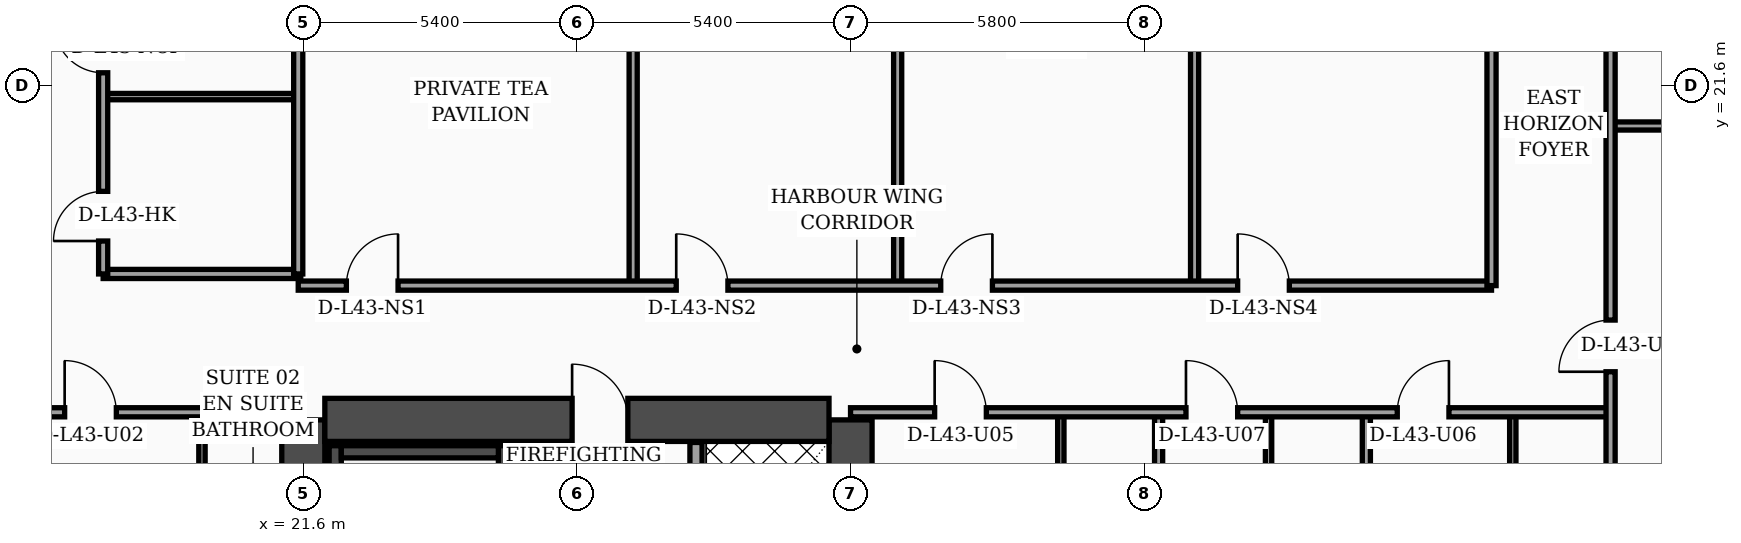
"""IFC4 building model, lengths in metres.
Left out: names, types, materials, properties, quantities, classifications, styles, units other than length and angle.
Written with IfcOpenShell. Run it as: python <this file> out.ifc"""

import sys

from ifc_helpers import new_model, si_unit, direction, frame, frame_2d, origin, place, context, subcontext, project, spatial, rectangle, extrude, element, fill, save


model = new_model("IFC4")
c1 = context("Model", 3, precision=1e-05, world=origin(), true_north=direction((0.0, 1.0)))
c2 = subcontext(c1, "Body", "Model", "MODEL_VIEW")
j1 = project(units=[si_unit("LENGTHUNIT", "METRE"), si_unit("PLANEANGLEUNIT", "RADIAN")], contexts=[c1])
p1 = place(None, origin())
s1 = spatial("IfcSite", under=j1, at=p1, CompositionType="ELEMENT")
p2 = place(p1, origin())
s2 = spatial("IfcBuilding", under=s1, at=p2, CompositionType="ELEMENT")
p3 = place(p2, frame((0.0, 0.0, 175.1)))
s3 = spatial("IfcBuildingStorey", under=s2, at=p3, CompositionType="ELEMENT", Elevation=175.1)
for number, where, z_axis, x_axis in (
    (1, (21.6, 4.6, 0.0), (0.0, 0.0, 1.0), (0.0, 1.0, 0.0)),
    (2, (32.4, 4.6, 0.0), (0.0, 0.0, 1.0), (0.0, 1.0, 0.0)),
):
    element("IfcWall", number, at=place(p3, frame(where, z_axis=z_axis, x_axis=x_axis)), inside=s3, PredefinedType="SHEAR", context=c2, shape_type="SweptSolid", body=[
        extrude(rectangle(XDim=10.4, YDim=0.85, at=frame_2d((5.2, 0.0))), origin(), (0.0, 0.0, 1.0), 3.56),
    ])
p4 = place(p3, frame((22.025, 15.0, 0.0), z_axis=(0.0, 0.0, 1.0), x_axis=(1.0, 0.0, 0.0)))
e3 = element("IfcWall", 3, at=p4, inside=s3, PredefinedType="SHEAR", context=c2, shape_type="SweptSolid", body=[
    extrude(rectangle(XDim=9.95, YDim=0.85, at=frame_2d((4.975, 0.0))), origin(), (0.0, 0.0, 1.0), 3.56),
])
p5 = place(p4, frame((4.88, 0.0, 0.0)))
e4 = element("IfcOpeningElement", 4, at=p5, cuts=e3, PredefinedType="OPENING", context=c2, shape_type="SweptSolid", body=[
    extrude(rectangle(XDim=1.1, YDim=2.2, at=frame_2d((0.55, 1.1))), frame((0.0, 0.435, 0.0), z_axis=(0.0, -1.0, 0.0), x_axis=(1.0, 0.0, 0.0)), (0.0, 0.0, 1.0), 0.87),
])
p6 = place(p3, frame((22.23, 5.025, 0.0), z_axis=(0.0, 0.0, 1.0), x_axis=(0.0, 1.0, 0.0)))
e5 = element("IfcWall", 5, at=p6, inside=s3, PredefinedType="SOLIDWALL", context=c2, shape_type="SweptSolid", body=[
    extrude(rectangle(XDim=9.465, YDim=0.24, at=frame_2d((4.732, 0.0))), origin(), (0.0, 0.0, 1.0), 3.56),
])
p7 = place(p3, frame((25.57, 5.025, 0.0), z_axis=(0.0, 0.0, 1.0), x_axis=(0.0, 1.0, 0.0)))
e6 = element("IfcWall", 6, at=p7, inside=s3, PredefinedType="SOLIDWALL", context=c2, shape_type="SweptSolid", body=[
    extrude(rectangle(XDim=9.465, YDim=0.24, at=frame_2d((4.732, 0.0))), origin(), (0.0, 0.0, 1.0), 3.56),
])
p8 = place(p7, frame((0.35, 0.0, 0.0)))
e7 = element("IfcOpeningElement", 7, at=p8, cuts=e6, PredefinedType="OPENING", context=c2, shape_type="SweptSolid", body=[
    extrude(rectangle(XDim=1.15, YDim=2.2, at=frame_2d((0.575, 1.1))), frame((0.0, 0.13, 0.0), z_axis=(0.0, -1.0, 0.0), x_axis=(1.0, 0.0, 0.0)), (0.0, 0.0, 1.0), 0.26),
])
p9 = place(p3, frame((22.35, 14.37, 0.0), z_axis=(0.0, 0.0, 1.0), x_axis=(1.0, 0.0, 0.0)))
e8 = element("IfcWall", 8, at=p9, inside=s3, PredefinedType="SOLIDWALL", context=c2, shape_type="SweptSolid", body=[
    extrude(rectangle(XDim=3.1, YDim=0.24, at=frame_2d((1.55, 0.0))), origin(), (0.0, 0.0, 1.0), 3.56),
])
p10 = place(p3, frame((29.35, 5.045, 0.0), z_axis=(0.0, 0.0, 1.0), x_axis=(0.0, 1.0, 0.0)))
e9 = element("IfcWall", 9, at=p10, inside=s3, PredefinedType="SOLIDWALL", context=c2, shape_type="SweptSolid", body=[
    extrude(rectangle(XDim=9.51, YDim=0.24, at=frame_2d((4.755, 0.0))), origin(), (0.0, 0.0, 1.0), 3.56),
])
p11 = place(p10, frame((0.55, 0.0, 0.0)))
e10 = element("IfcOpeningElement", 10, at=p11, cuts=e9, PredefinedType="OPENING", context=c2, shape_type="SweptSolid", body=[
    extrude(rectangle(XDim=1.3, YDim=2.35, at=frame_2d((0.65, 1.175))), frame((0.0, 0.13, 0.0), z_axis=(0.0, -1.0, 0.0), x_axis=(1.0, 0.0, 0.0)), (0.0, 0.0, 1.0), 0.26),
])
p12 = place(p3, frame((19.6, 2.44, 0.0), z_axis=(0.0, 0.0, 1.0), x_axis=(0.0, 1.0, 0.0)))
e11 = element("IfcWall", 11, at=p12, inside=s3, PredefinedType="PARTITIONING", context=c2, shape_type="SweptSolid", body=[
    extrude(rectangle(XDim=12.71, YDim=0.125, at=frame_2d((6.355, 0.0))), origin(), (0.0, 0.0, 1.0), 2.49),
])
p13 = place(p12, frame((4.34, 0.0, 0.0)))
e12 = element("IfcOpeningElement", 12, at=p13, cuts=e11, PredefinedType="OPENING", context=c2, shape_type="SweptSolid", body=[
    extrude(rectangle(XDim=0.96, YDim=2.2, at=frame_2d((0.48, 1.1))), frame((0.0, 0.073, 0.0), z_axis=(0.0, -1.0, 0.0), x_axis=(1.0, 0.0, 0.0)), (0.0, 0.0, 1.0), 0.145),
])
p14 = place(p12, frame((10.18, 0.0, 0.0)))
e13 = element("IfcOpeningElement", 13, at=p14, cuts=e11, PredefinedType="OPENING", context=c2, shape_type="SweptSolid", body=[
    extrude(rectangle(XDim=0.9, YDim=2.15, at=frame_2d((0.45, 1.075))), frame((0.0, 0.073, 0.0), z_axis=(0.0, -1.0, 0.0), x_axis=(1.0, 0.0, 0.0)), (0.0, 0.0, 1.0), 0.145),
])
p15 = place(p3, frame((15.15, 15.15, 0.0), z_axis=(0.0, 0.0, 1.0), x_axis=(1.0, 0.0, 0.0)))
e14 = element("IfcWall", 14, at=p15, inside=s3, PredefinedType="PARTITIONING", context=c2, shape_type="SweptSolid", body=[
    extrude(rectangle(XDim=6.45, YDim=0.18, at=frame_2d((3.225, 0.0))), origin(), (0.0, 0.0, 1.0), 2.49),
])
p16 = place(p15, frame((1.74, 0.0, 0.0)))
e15 = element("IfcOpeningElement", 15, at=p16, cuts=e14, PredefinedType="OPENING", context=c2, shape_type="SweptSolid", body=[
    extrude(rectangle(XDim=1.02, YDim=2.2, at=frame_2d((0.51, 1.1))), frame((0.0, 0.1, 0.0), z_axis=(0.0, -1.0, 0.0), x_axis=(1.0, 0.0, 0.0)), (0.0, 0.0, 1.0), 0.2),
])
p17 = place(p3, frame((17.65, 17.88, 0.0), z_axis=(0.0, 0.0, 1.0), x_axis=(1.0, 0.0, 0.0)))
e16 = element("IfcWall", 16, at=p17, inside=s3, PredefinedType="PARTITIONING", context=c2, shape_type="SweptSolid", body=[
    extrude(rectangle(XDim=3.9, YDim=0.18, at=frame_2d((1.95, 0.0))), origin(), (0.0, 0.0, 1.0), 3.09),
])
p18 = place(p3, frame((17.65, 21.38, 0.0), z_axis=(0.0, 0.0, 1.0), x_axis=(1.0, 0.0, 0.0)))
e17 = element("IfcWall", 17, at=p18, inside=s3, PredefinedType="PARTITIONING", context=c2, shape_type="SweptSolid", body=[
    extrude(rectangle(XDim=3.9, YDim=0.125, at=frame_2d((1.95, 0.0))), origin(), (0.0, 0.0, 1.0), 3.56),
])
p19 = place(p3, frame((21.5, 17.88, 0.0), z_axis=(0.0, 0.0, 1.0), x_axis=(0.0, 1.0, 0.0)))
e18 = element("IfcWall", 18, at=p19, inside=s3, PredefinedType="PARTITIONING", context=c2, shape_type="SweptSolid", body=[
    extrude(rectangle(XDim=6.44, YDim=0.18, at=frame_2d((3.22, 0.0))), origin(), (0.0, 0.0, 1.0), 3.09),
])
p20 = place(p3, frame((17.65, 17.88, 0.0), z_axis=(0.0, 0.0, 1.0), x_axis=(0.0, 1.0, 0.0)))
e19 = element("IfcWall", 19, at=p20, inside=s3, PredefinedType="PARTITIONING", context=c2, shape_type="SweptSolid", body=[
    extrude(rectangle(XDim=6.44, YDim=0.18, at=frame_2d((3.22, 0.0))), origin(), (0.0, 0.0, 1.0), 3.09),
])
p21 = place(p20, frame((0.65, 0.0, 0.0)))
e20 = element("IfcOpeningElement", 20, at=p21, cuts=e19, PredefinedType="OPENING", context=c2, shape_type="SweptSolid", body=[
    extrude(rectangle(XDim=0.98, YDim=2.15, at=frame_2d((0.49, 1.075))), frame((0.0, 0.1, 0.0), z_axis=(0.0, -1.0, 0.0), x_axis=(1.0, 0.0, 0.0)), (0.0, 0.0, 1.0), 0.2),
])
p22 = place(p20, frame((3.97, 0.0, 0.0)))
e21 = element("IfcOpeningElement", 21, at=p22, cuts=e19, PredefinedType="OPENING", context=c2, shape_type="SweptSolid", body=[
    extrude(rectangle(XDim=0.96, YDim=2.2, at=frame_2d((0.48, 1.1))), frame((0.0, 0.1, 0.0), z_axis=(0.0, -1.0, 0.0), x_axis=(1.0, 0.0, 0.0)), (0.0, 0.0, 1.0), 0.2),
])
p23 = place(p3, frame((36.55, 2.44, 0.0), z_axis=(0.0, 0.0, 1.0), x_axis=(0.0, 1.0, 0.0)))
e22 = element("IfcWall", 22, at=p23, inside=s3, PredefinedType="PARTITIONING", context=c2, shape_type="SweptSolid", body=[
    extrude(rectangle(XDim=12.71, YDim=0.125, at=frame_2d((6.355, 0.0))), origin(), (0.0, 0.0, 1.0), 2.94),
])
p24 = place(p23, frame((4.35, 0.0, 0.0)))
e23 = element("IfcOpeningElement", 23, at=p24, cuts=e22, PredefinedType="OPENING", context=c2, shape_type="SweptSolid", body=[
    extrude(rectangle(XDim=0.96, YDim=2.2, at=frame_2d((0.48, 1.1))), frame((0.0, 0.073, 0.0), z_axis=(0.0, -1.0, 0.0), x_axis=(1.0, 0.0, 0.0)), (0.0, 0.0, 1.0), 0.145),
])
p25 = place(p23, frame((10.21, 0.0, 0.0)))
e24 = element("IfcOpeningElement", 24, at=p25, cuts=e22, PredefinedType="OPENING", context=c2, shape_type="SweptSolid", body=[
    extrude(rectangle(XDim=0.9, YDim=2.15, at=frame_2d((0.45, 1.075))), frame((0.0, 0.073, 0.0), z_axis=(0.0, -1.0, 0.0), x_axis=(1.0, 0.0, 0.0)), (0.0, 0.0, 1.0), 0.145),
])
p26 = place(p3, frame((40.65, 2.44, 0.0), z_axis=(0.0, 0.0, 1.0), x_axis=(0.0, 1.0, 0.0)))
e25 = element("IfcWall", 25, at=p26, inside=s3, PredefinedType="PARTITIONING", context=c2, shape_type="SweptSolid", body=[
    extrude(rectangle(XDim=12.71, YDim=0.125, at=frame_2d((6.355, 0.0))), origin(), (0.0, 0.0, 1.0), 2.94),
])
p27 = place(p26, frame((4.35, 0.0, 0.0)))
e26 = element("IfcOpeningElement", 26, at=p27, cuts=e25, PredefinedType="OPENING", context=c2, shape_type="SweptSolid", body=[
    extrude(rectangle(XDim=0.96, YDim=2.2, at=frame_2d((0.48, 1.1))), frame((0.0, 0.073, 0.0), z_axis=(0.0, -1.0, 0.0), x_axis=(1.0, 0.0, 0.0)), (0.0, 0.0, 1.0), 0.145),
])
p28 = place(p26, frame((10.21, 0.0, 0.0)))
e27 = element("IfcOpeningElement", 27, at=p28, cuts=e25, PredefinedType="OPENING", context=c2, shape_type="SweptSolid", body=[
    extrude(rectangle(XDim=0.9, YDim=2.15, at=frame_2d((0.45, 1.075))), frame((0.0, 0.073, 0.0), z_axis=(0.0, -1.0, 0.0), x_axis=(1.0, 0.0, 0.0)), (0.0, 0.0, 1.0), 0.145),
])
p29 = place(p3, frame((38.48, 2.44, 0.0), z_axis=(0.0, 0.0, 1.0), x_axis=(0.0, 1.0, 0.0)))
e28 = element("IfcWall", 28, at=p29, inside=s3, PredefinedType="PARTITIONING", context=c2, shape_type="SweptSolid", body=[
    extrude(rectangle(XDim=12.71, YDim=0.16, at=frame_2d((6.355, 0.0))), origin(), (0.0, 0.0, 1.0), 2.94),
])
p30 = place(p3, frame((45.47, 2.44, 0.0), z_axis=(0.0, 0.0, 1.0), x_axis=(0.0, 1.0, 0.0)))
e29 = element("IfcWall", 29, at=p30, inside=s3, PredefinedType="PARTITIONING", context=c2, shape_type="SweptSolid", body=[
    extrude(rectangle(XDim=12.71, YDim=0.125, at=frame_2d((6.355, 0.0))), origin(), (0.0, 0.0, 1.0), 3.04),
])
p31 = place(p30, frame((4.35, 0.0, 0.0)))
e30 = element("IfcOpeningElement", 30, at=p31, cuts=e29, PredefinedType="OPENING", context=c2, shape_type="SweptSolid", body=[
    extrude(rectangle(XDim=0.96, YDim=2.2, at=frame_2d((0.48, 1.1))), frame((0.0, 0.073, 0.0), z_axis=(0.0, -1.0, 0.0), x_axis=(1.0, 0.0, 0.0)), (0.0, 0.0, 1.0), 0.145),
])
p32 = place(p30, frame((10.21, 0.0, 0.0)))
e31 = element("IfcOpeningElement", 31, at=p32, cuts=e29, PredefinedType="OPENING", context=c2, shape_type="SweptSolid", body=[
    extrude(rectangle(XDim=0.9, YDim=2.15, at=frame_2d((0.45, 1.075))), frame((0.0, 0.073, 0.0), z_axis=(0.0, -1.0, 0.0), x_axis=(1.0, 0.0, 0.0)), (0.0, 0.0, 1.0), 0.145),
])
p33 = place(p3, frame((42.58, 2.44, 0.0), z_axis=(0.0, 0.0, 1.0), x_axis=(0.0, 1.0, 0.0)))
e32 = element("IfcWall", 32, at=p33, inside=s3, PredefinedType="PARTITIONING", context=c2, shape_type="SweptSolid", body=[
    extrude(rectangle(XDim=12.71, YDim=0.16, at=frame_2d((6.355, 0.0))), origin(), (0.0, 0.0, 1.0), 3.04),
])
p34 = place(p3, frame((32.4, 15.15, 0.0), z_axis=(0.0, 0.0, 1.0), x_axis=(1.0, 0.0, 0.0)))
e33 = element("IfcWall", 33, at=p34, inside=s3, PredefinedType="PARTITIONING", context=c2, shape_type="SweptSolid", body=[
    extrude(rectangle(XDim=15.0, YDim=0.18, at=frame_2d((7.5, 0.0))), origin(), (0.0, 0.0, 1.0), 2.94),
])
p35 = place(p34, frame((1.66, 0.0, 0.0)))
e34 = element("IfcOpeningElement", 34, at=p35, cuts=e33, PredefinedType="OPENING", context=c2, shape_type="SweptSolid", body=[
    extrude(rectangle(XDim=1.02, YDim=2.2, at=frame_2d((0.51, 1.1))), frame((0.0, 0.1, 0.0), z_axis=(0.0, -1.0, 0.0), x_axis=(1.0, 0.0, 0.0)), (0.0, 0.0, 1.0), 0.2),
])
p36 = place(p34, frame((10.79, 0.0, 0.0)))
e35 = element("IfcOpeningElement", 35, at=p36, cuts=e33, PredefinedType="OPENING", context=c2, shape_type="SweptSolid", body=[
    extrude(rectangle(XDim=1.02, YDim=2.2, at=frame_2d((0.51, 1.1))), frame((0.0, 0.1, 0.0), z_axis=(0.0, -1.0, 0.0), x_axis=(1.0, 0.0, 0.0)), (0.0, 0.0, 1.0), 0.2),
])
p37 = place(p34, frame((6.62, 0.0, 0.0)))
e36 = element("IfcOpeningElement", 36, at=p37, cuts=e33, PredefinedType="OPENING", context=c2, shape_type="SweptSolid", body=[
    extrude(rectangle(XDim=1.02, YDim=2.2, at=frame_2d((0.51, 1.1))), frame((0.0, 0.1, 0.0), z_axis=(0.0, -1.0, 0.0), x_axis=(1.0, 0.0, 0.0)), (0.0, 0.0, 1.0), 0.2),
])
p38 = place(p3, frame((28.11, 17.65, 0.0), z_axis=(0.0, 0.0, 1.0), x_axis=(0.0, 1.0, 0.0)))
e37 = element("IfcWall", 37, at=p38, inside=s3, PredefinedType="PARTITIONING", context=c2, shape_type="SweptSolid", body=[
    extrude(rectangle(XDim=10.46, YDim=0.16, at=frame_2d((5.23, 0.0))), origin(), (0.0, 0.0, 1.0), 2.94),
])
p39 = place(p3, frame((33.33, 17.65, 0.0), z_axis=(0.0, 0.0, 1.0), x_axis=(0.0, 1.0, 0.0)))
e38 = element("IfcWall", 38, at=p39, inside=s3, PredefinedType="PARTITIONING", context=c2, shape_type="SweptSolid", body=[
    extrude(rectangle(XDim=13.37, YDim=0.16, at=frame_2d((6.685, 0.0))), origin(), (0.0, 0.0, 1.0), 2.94),
])
p40 = place(p3, frame((39.19, 17.65, 0.0), z_axis=(0.0, 0.0, 1.0), x_axis=(0.0, 1.0, 0.0)))
e39 = element("IfcWall", 39, at=p40, inside=s3, PredefinedType="PARTITIONING", context=c2, shape_type="SweptSolid", body=[
    extrude(rectangle(XDim=16.63, YDim=0.16, at=frame_2d((8.315, 0.0))), origin(), (0.0, 0.0, 1.0), 2.94),
])
p41 = place(p3, frame((21.5, 17.65, 0.0), z_axis=(0.0, 0.0, 1.0), x_axis=(1.0, 0.0, 0.0)))
e40 = element("IfcWall", 40, at=p41, inside=s3, PredefinedType="PARTITIONING", context=c2, shape_type="SweptSolid", body=[
    extrude(rectangle(XDim=23.55, YDim=0.18, at=frame_2d((11.775, 0.0))), origin(), (0.0, 0.0, 1.0), 2.94),
])
p42 = place(p41, frame((0.95, 0.0, 0.0)))
e41 = element("IfcOpeningElement", 41, at=p42, cuts=e40, PredefinedType="OPENING", context=c2, shape_type="SweptSolid", body=[
    extrude(rectangle(XDim=1.02, YDim=2.2, at=frame_2d((0.51, 1.1))), frame((0.0, 0.1, 0.0), z_axis=(0.0, -1.0, 0.0), x_axis=(1.0, 0.0, 0.0)), (0.0, 0.0, 1.0), 0.2),
])
p43 = place(p41, frame((7.46, 0.0, 0.0)))
e42 = element("IfcOpeningElement", 42, at=p43, cuts=e40, PredefinedType="OPENING", context=c2, shape_type="SweptSolid", body=[
    extrude(rectangle(XDim=1.02, YDim=2.2, at=frame_2d((0.51, 1.1))), frame((0.0, 0.1, 0.0), z_axis=(0.0, -1.0, 0.0), x_axis=(1.0, 0.0, 0.0)), (0.0, 0.0, 1.0), 0.2),
])
p44 = place(p41, frame((12.68, 0.0, 0.0)))
e43 = element("IfcOpeningElement", 43, at=p44, cuts=e40, PredefinedType="OPENING", context=c2, shape_type="SweptSolid", body=[
    extrude(rectangle(XDim=1.02, YDim=2.2, at=frame_2d((0.51, 1.1))), frame((0.0, 0.1, 0.0), z_axis=(0.0, -1.0, 0.0), x_axis=(1.0, 0.0, 0.0)), (0.0, 0.0, 1.0), 0.2),
])
p45 = place(p41, frame((18.54, 0.0, 0.0)))
e44 = element("IfcOpeningElement", 44, at=p45, cuts=e40, PredefinedType="OPENING", context=c2, shape_type="SweptSolid", body=[
    extrude(rectangle(XDim=1.02, YDim=2.2, at=frame_2d((0.51, 1.1))), frame((0.0, 0.1, 0.0), z_axis=(0.0, -1.0, 0.0), x_axis=(1.0, 0.0, 0.0)), (0.0, 0.0, 1.0), 0.2),
])
p46 = place(p3, frame((45.05, 17.65, 0.0), z_axis=(0.0, 0.0, 1.0), x_axis=(0.0, 1.0, 0.0)))
e45 = element("IfcWall", 45, at=p46, inside=s3, PredefinedType="PARTITIONING", context=c2, shape_type="SweptSolid", body=[
    extrude(rectangle(XDim=19.9, YDim=0.18, at=frame_2d((9.95, 0.0))), origin(), (0.0, 0.0, 1.0), 2.94),
])
p47 = place(p3, frame((47.4, 20.8, 0.0), z_axis=(0.0, 0.0, 1.0), x_axis=(1.0, 0.0, 0.0)))
e46 = element("IfcWall", 46, at=p47, inside=s3, PredefinedType="PARTITIONING", context=c2, shape_type="SweptSolid", body=[
    extrude(rectangle(XDim=6.95, YDim=0.16, at=frame_2d((3.475, 0.0))), origin(), (0.0, 0.0, 1.0), 3.04),
])
p48 = place(p3, frame((47.4, 2.44, 0.0), z_axis=(0.0, 0.0, 1.0), x_axis=(0.0, 1.0, 0.0)))
e47 = element("IfcWall", 47, at=p48, inside=s3, PredefinedType="PARTITIONING", context=c2, shape_type="SweptSolid", body=[
    extrude(rectangle(XDim=27.84, YDim=0.18, at=frame_2d((13.92, 0.0))), origin(), (0.0, 0.0, 1.0), 2.94),
])
p49 = place(p48, frame((13.51, 0.0, 0.0)))
e48 = element("IfcOpeningElement", 48, at=p49, cuts=e47, PredefinedType="OPENING", context=c2, shape_type="SweptSolid", body=[
    extrude(rectangle(XDim=1.02, YDim=2.2, at=frame_2d((0.51, 1.1))), frame((0.0, 0.1, 0.0), z_axis=(0.0, -1.0, 0.0), x_axis=(1.0, 0.0, 0.0)), (0.0, 0.0, 1.0), 0.2),
])
p50 = place(p48, frame((21.52, 0.0, 0.0)))
e49 = element("IfcOpeningElement", 49, at=p50, cuts=e47, PredefinedType="OPENING", context=c2, shape_type="SweptSolid", body=[
    extrude(rectangle(XDim=1.02, YDim=2.2, at=frame_2d((0.51, 1.1))), frame((0.0, 0.1, 0.0), z_axis=(0.0, -1.0, 0.0), x_axis=(1.0, 0.0, 0.0)), (0.0, 0.0, 1.0), 0.2),
])
p51 = place(p16, origin())
e50 = element("IfcDoor", 50, at=p51, inside=s3, OperationType="SINGLE_SWING_LEFT", PredefinedType="DOOR", context=c2, shape_type="SweptSolid", body=[
    extrude(rectangle(XDim=1.02, YDim=2.2, at=frame_2d((0.51, 1.1))), frame((0.0, 0.025, 0.0), z_axis=(0.0, -1.0, 0.0), x_axis=(1.0, 0.0, 0.0)), (0.0, 0.0, 1.0), 0.05),
])
fill(e15, e50)
p52 = place(p21, origin())
e51 = element("IfcDoor", 51, at=p52, inside=s3, OperationType="SINGLE_SWING_LEFT", PredefinedType="DOOR", context=c2, shape_type="SweptSolid", body=[
    extrude(rectangle(XDim=0.98, YDim=2.15, at=frame_2d((0.49, 1.075))), frame((0.0, 0.025, 0.0), z_axis=(0.0, -1.0, 0.0), x_axis=(1.0, 0.0, 0.0)), (0.0, 0.0, 1.0), 0.05),
])
fill(e20, e51)
p53 = place(p22, origin())
e52 = element("IfcDoor", 52, at=p53, inside=s3, OperationType="SINGLE_SWING_RIGHT", PredefinedType="DOOR", context=c2, shape_type="SweptSolid", body=[
    extrude(rectangle(XDim=0.96, YDim=2.2, at=frame_2d((0.48, 1.1))), frame((0.0, 0.025, 0.0), z_axis=(0.0, -1.0, 0.0), x_axis=(1.0, 0.0, 0.0)), (0.0, 0.0, 1.0), 0.05),
])
fill(e21, e52)
p54 = place(p35, origin())
e53 = element("IfcDoor", 53, at=p54, inside=s3, OperationType="SINGLE_SWING_LEFT", PredefinedType="DOOR", context=c2, shape_type="SweptSolid", body=[
    extrude(rectangle(XDim=1.02, YDim=2.2, at=frame_2d((0.51, 1.1))), frame((0.0, 0.025, 0.0), z_axis=(0.0, -1.0, 0.0), x_axis=(1.0, 0.0, 0.0)), (0.0, 0.0, 1.0), 0.05),
])
fill(e34, e53)
p55 = place(p36, origin())
e54 = element("IfcDoor", 54, at=p55, inside=s3, OperationType="SINGLE_SWING_RIGHT", PredefinedType="DOOR", context=c2, shape_type="SweptSolid", body=[
    extrude(rectangle(XDim=1.02, YDim=2.2, at=frame_2d((0.51, 1.1))), frame((0.0, 0.025, 0.0), z_axis=(0.0, -1.0, 0.0), x_axis=(1.0, 0.0, 0.0)), (0.0, 0.0, 1.0), 0.05),
])
fill(e35, e54)
p56 = place(p37, origin())
e55 = element("IfcDoor", 55, at=p56, inside=s3, OperationType="SINGLE_SWING_LEFT", PredefinedType="DOOR", context=c2, shape_type="SweptSolid", body=[
    extrude(rectangle(XDim=1.02, YDim=2.2, at=frame_2d((0.51, 1.1))), frame((0.0, 0.025, 0.0), z_axis=(0.0, -1.0, 0.0), x_axis=(1.0, 0.0, 0.0)), (0.0, 0.0, 1.0), 0.05),
])
fill(e36, e55)
p57 = place(p42, origin())
e56 = element("IfcDoor", 56, at=p57, inside=s3, OperationType="SINGLE_SWING_RIGHT", PredefinedType="DOOR", context=c2, shape_type="SweptSolid", body=[
    extrude(rectangle(XDim=1.02, YDim=2.2, at=frame_2d((0.51, 1.1))), frame((0.0, 0.025, 0.0), z_axis=(0.0, -1.0, 0.0), x_axis=(1.0, 0.0, 0.0)), (0.0, 0.0, 1.0), 0.05),
])
fill(e41, e56)
p58 = place(p43, origin())
e57 = element("IfcDoor", 57, at=p58, inside=s3, OperationType="SINGLE_SWING_LEFT", PredefinedType="DOOR", context=c2, shape_type="SweptSolid", body=[
    extrude(rectangle(XDim=1.02, YDim=2.2, at=frame_2d((0.51, 1.1))), frame((0.0, 0.025, 0.0), z_axis=(0.0, -1.0, 0.0), x_axis=(1.0, 0.0, 0.0)), (0.0, 0.0, 1.0), 0.05),
])
fill(e42, e57)
p59 = place(p44, origin())
e58 = element("IfcDoor", 58, at=p59, inside=s3, OperationType="SINGLE_SWING_RIGHT", PredefinedType="DOOR", context=c2, shape_type="SweptSolid", body=[
    extrude(rectangle(XDim=1.02, YDim=2.2, at=frame_2d((0.51, 1.1))), frame((0.0, 0.025, 0.0), z_axis=(0.0, -1.0, 0.0), x_axis=(1.0, 0.0, 0.0)), (0.0, 0.0, 1.0), 0.05),
])
fill(e43, e58)
p60 = place(p45, origin())
e59 = element("IfcDoor", 59, at=p60, inside=s3, OperationType="SINGLE_SWING_LEFT", PredefinedType="DOOR", context=c2, shape_type="SweptSolid", body=[
    extrude(rectangle(XDim=1.02, YDim=2.2, at=frame_2d((0.51, 1.1))), frame((0.0, 0.025, 0.0), z_axis=(0.0, -1.0, 0.0), x_axis=(1.0, 0.0, 0.0)), (0.0, 0.0, 1.0), 0.05),
])
fill(e44, e59)
p61 = place(p49, origin())
e60 = element("IfcDoor", 60, at=p61, inside=s3, OperationType="SINGLE_SWING_LEFT", PredefinedType="DOOR", context=c2, shape_type="SweptSolid", body=[
    extrude(rectangle(XDim=1.02, YDim=2.2, at=frame_2d((0.51, 1.1))), frame((0.0, 0.025, 0.0), z_axis=(0.0, -1.0, 0.0), x_axis=(1.0, 0.0, 0.0)), (0.0, 0.0, 1.0), 0.05),
])
fill(e48, e60)
p62 = place(p5, origin())
e61 = element("IfcDoor", 61, at=p62, inside=s3, OperationType="SINGLE_SWING_LEFT", PredefinedType="DOOR", context=c2, shape_type="SweptSolid", body=[
    extrude(rectangle(XDim=1.1, YDim=2.2, at=frame_2d((0.55, 1.1))), frame((0.0, 0.025, 0.0), z_axis=(0.0, -1.0, 0.0), x_axis=(1.0, 0.0, 0.0)), (0.0, 0.0, 1.0), 0.05),
])
fill(e4, e61)
save(model, sys.argv[1])
